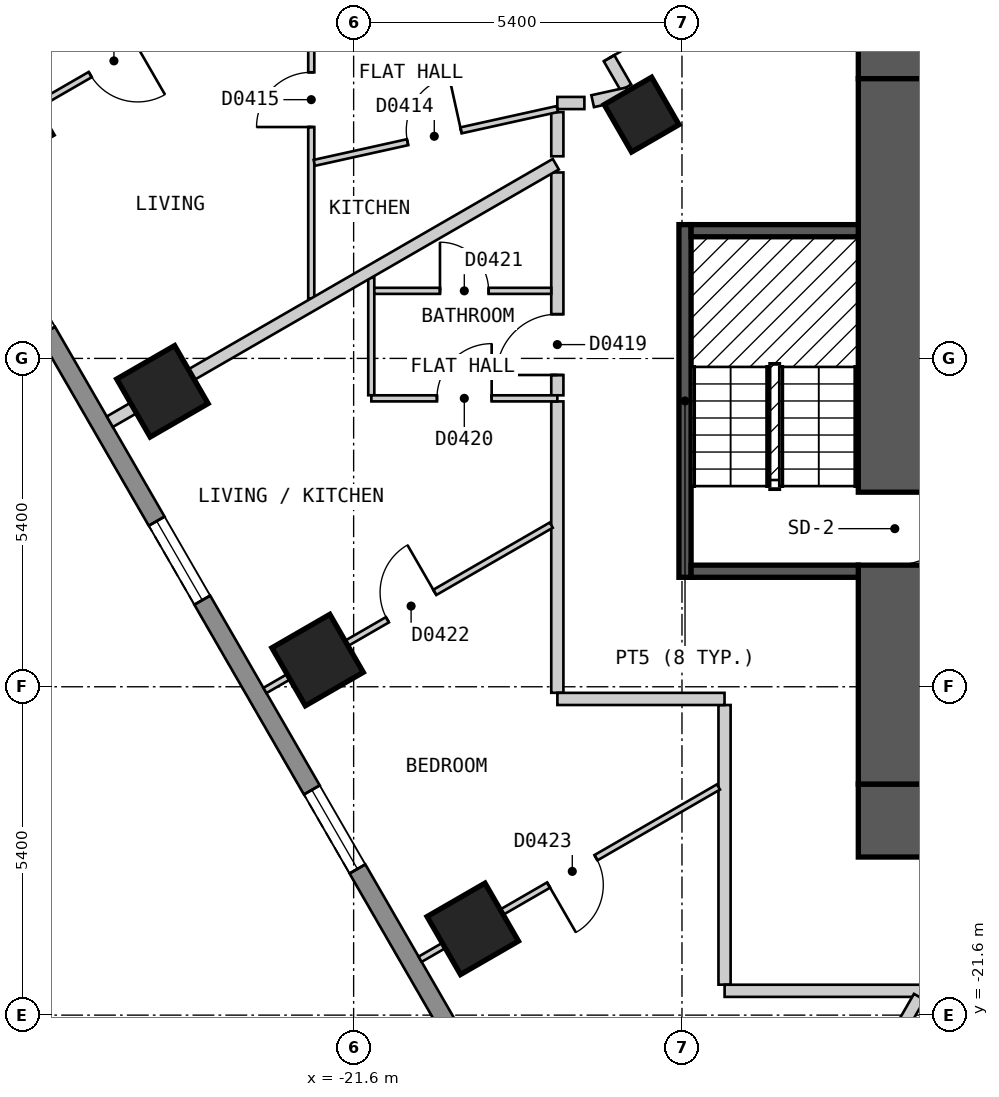
"""IFC4 building model, lengths in metres.
Left out: names, types, materials, properties, quantities, classifications, styles, units other than length and angle.
Written with IfcOpenShell. Run it as: python <this file> out.ifc"""

import sys

from ifc_helpers import new_model, si_unit, direction, frame, frame_2d, origin, origin_2d, place, context, subcontext, project, spatial, polyline, rectangle, outline, extrude, element, fill, save


model = new_model("IFC4")
c1 = context("Model", 3, precision=1e-05, world=origin(), true_north=direction((0.0, 1.0)))
c2 = subcontext(c1, "Body", "Model", "MODEL_VIEW")
j1 = project(units=[si_unit("LENGTHUNIT", "METRE"), si_unit("PLANEANGLEUNIT", "RADIAN")], contexts=[c1])
p1 = place(None, origin())
s1 = spatial("IfcSite", under=j1, at=p1, CompositionType="ELEMENT")
p2 = place(p1, origin())
s2 = spatial("IfcBuilding", under=s1, at=p2, CompositionType="ELEMENT")
p3 = place(p2, frame((0.0, 0.0, 32.4)))
s3 = spatial("IfcBuildingStorey", under=s2, at=p3, CompositionType="ELEMENT", Elevation=32.4)
for number, where, z_axis, x_axis in (
    (1, (-27.297, -6.921, 0.0), (0.0, 0.0, 1.0), (0.5, -0.866, 0.0)),
    (2, (-24.745, -11.341, 0.0), (0.0, 0.0, 1.0), (0.5, -0.866, 0.0)),
    (3, (-22.193, -15.761, 0.0), (0.0, 0.0, 1.0), (0.5, -0.866, 0.0)),
    (4, (-19.641, -20.181, 0.0), (0.0, 0.0, 1.0), (0.5, -0.866, 0.0)),
):
    element("IfcColumn", number, at=place(p3, frame(where, z_axis=z_axis, x_axis=x_axis)), inside=s3, PredefinedType="COLUMN", context=c2, shape_type="SweptSolid", body=[
        extrude(rectangle(XDim=1.1, YDim=1.1, at=origin_2d()), origin(), (0.0, 0.0, 1.0), 3.0),
    ])
p4 = place(p3, frame((-16.864, -6.791, 0.0), z_axis=(0.0, 0.0, 1.0), x_axis=(0.499984884929, -0.866034130299, 0.0)))
e5 = element("IfcColumn", 5, at=p4, inside=s3, PredefinedType="COLUMN", context=c2, shape_type="SweptSolid", body=[
    extrude(rectangle(XDim=0.9, YDim=0.9, at=origin_2d()), origin(), (0.0, 0.0, 1.0), 3.0),
])
p5 = place(p3, frame((-13.3, -18.4, 0.0), z_axis=(0.0, 0.0, 1.0), x_axis=(1.0, 0.0, 0.0)))
e6 = element("IfcWall", 6, at=p5, inside=s3, PredefinedType="SHEAR", context=c2, shape_type="SweptSolid", body=[
    extrude(rectangle(XDim=26.6, YDim=1.2, at=frame_2d((13.3, 0.0))), origin(), (0.0, 0.0, 1.0), 2.7),
])
p6 = place(p3, frame((-13.3, -5.6, 0.0), z_axis=(0.0, 0.0, 1.0), x_axis=(1.0, 0.0, 0.0)))
e7 = element("IfcWall", 7, at=p6, inside=s3, PredefinedType="SHEAR", context=c2, shape_type="SweptSolid", body=[
    extrude(rectangle(XDim=26.6, YDim=1.2, at=frame_2d((13.3, 0.0))), origin(), (0.0, 0.0, 1.0), 2.7),
])
p7 = place(p6, frame((23.65, 0.0, 0.0)))
e8 = element("IfcOpeningElement", 8, at=p7, cuts=e7, PredefinedType="OPENING", context=c2, shape_type="SweptSolid", body=[
    extrude(rectangle(XDim=1.2, YDim=2.1, at=frame_2d((0.6, 1.05))), frame((0.0, 0.61, 0.0), z_axis=(0.0, -1.0, 0.0), x_axis=(1.0, 0.0, 0.0)), (0.0, 0.0, 1.0), 1.22),
])
p8 = place(p3, frame((-12.7, -17.8, 0.0), z_axis=(0.0, 0.0, 1.0), x_axis=(0.0, 1.0, 0.0)))
e9 = element("IfcWall", 9, at=p8, inside=s3, PredefinedType="SHEAR", context=c2, shape_type="SweptSolid", body=[
    extrude(rectangle(XDim=11.6, YDim=1.2, at=frame_2d((5.8, 0.0))), origin(), (0.0, 0.0, 1.0), 2.7),
])
p9 = place(p8, frame((3.6, 0.0, 0.0)))
e10 = element("IfcOpeningElement", 10, at=p9, cuts=e9, PredefinedType="OPENING", context=c2, shape_type="SweptSolid", body=[
    extrude(rectangle(XDim=1.2, YDim=2.1, at=frame_2d((0.6, 1.05))), frame((0.0, 0.61, 0.0), z_axis=(0.0, -1.0, 0.0), x_axis=(1.0, 0.0, 0.0)), (0.0, 0.0, 1.0), 1.22),
])
p10 = place(p3, frame((-31.22, -2.425, 0.0), z_axis=(0.0, 0.0, 1.0), x_axis=(0.500001938803, -0.866024284413, 0.0)))
e11 = element("IfcWall", 11, at=p10, inside=s3, PredefinedType="SOLIDWALL", context=c2, shape_type="SweptSolid", body=[
    extrude(outline(polyline([(0.0, -0.15), (27.02, -0.15), (26.94, 0.15), (0.08, 0.15), (0.0, -0.15)])), origin(), (0.0, 0.0, 1.0), 2.7),
])
p11 = place(p10, frame((2.553, 0.0, 0.15)))
e12 = element("IfcOpeningElement", 12, at=p11, cuts=e11, PredefinedType="OPENING", context=c2, shape_type="SweptSolid", body=[
    extrude(rectangle(XDim=1.5, YDim=2.1, at=frame_2d((0.75, 1.05))), frame((0.0, 0.16, 0.0), z_axis=(0.0, -1.0, 0.0), x_axis=(1.0, 0.0, 0.0)), (0.0, 0.0, 1.0), 0.32),
])
p12 = place(p10, frame((7.657, 0.0, 0.15)))
e13 = element("IfcOpeningElement", 13, at=p12, cuts=e11, PredefinedType="OPENING", context=c2, shape_type="SweptSolid", body=[
    extrude(rectangle(XDim=1.5, YDim=2.1, at=frame_2d((0.75, 1.05))), frame((0.0, 0.16, 0.0), z_axis=(0.0, -1.0, 0.0), x_axis=(1.0, 0.0, 0.0)), (0.0, 0.0, 1.0), 0.32),
])
p13 = place(p10, frame((12.761, 0.0, 0.15)))
e14 = element("IfcOpeningElement", 14, at=p13, cuts=e11, PredefinedType="OPENING", context=c2, shape_type="SweptSolid", body=[
    extrude(rectangle(XDim=1.5, YDim=2.1, at=frame_2d((0.75, 1.05))), frame((0.0, 0.16, 0.0), z_axis=(0.0, -1.0, 0.0), x_axis=(1.0, 0.0, 0.0)), (0.0, 0.0, 1.0), 0.32),
])
p14 = place(p10, frame((17.865, 0.0, 0.15)))
e15 = element("IfcOpeningElement", 15, at=p14, cuts=e11, PredefinedType="OPENING", context=c2, shape_type="SweptSolid", body=[
    extrude(rectangle(XDim=1.5, YDim=2.1, at=frame_2d((0.75, 1.05))), frame((0.0, 0.16, 0.0), z_axis=(0.0, -1.0, 0.0), x_axis=(1.0, 0.0, 0.0)), (0.0, 0.0, 1.0), 0.32),
])
p15 = place(p10, frame((22.969, 0.0, 0.15)))
e16 = element("IfcOpeningElement", 16, at=p15, cuts=e11, PredefinedType="OPENING", context=c2, shape_type="SweptSolid", body=[
    extrude(rectangle(XDim=1.5, YDim=2.1, at=frame_2d((0.75, 1.05))), frame((0.0, 0.16, 0.0), z_axis=(0.0, -1.0, 0.0), x_axis=(1.0, 0.0, 0.0)), (0.0, 0.0, 1.0), 0.32),
])
p16 = place(p3, frame((-20.727, -0.101, 0.0), z_axis=(0.0, 0.0, 1.0), x_axis=(0.500049702773, -0.865996705973, 0.0)))
e17 = element("IfcWall", 17, at=p16, inside=s3, PredefinedType="PARTITIONING", context=c2, shape_type="SweptSolid", body=[
    extrude(rectangle(XDim=7.211, YDim=0.2, at=frame_2d((3.605, 0.0))), origin(), (0.0, 0.0, 1.0), 2.7),
])
p17 = place(p16, frame((5.654, 0.0, 0.0)))
e18 = element("IfcOpeningElement", 18, at=p17, cuts=e17, PredefinedType="OPENING", context=c2, shape_type="SweptSolid", body=[
    extrude(rectangle(XDim=1.0, YDim=2.1, at=frame_2d((0.5, 1.05))), frame((0.0, 0.11, 0.0), z_axis=(0.0, -1.0, 0.0), x_axis=(1.0, 0.0, 0.0)), (0.0, 0.0, 1.0), 0.22),
])
p18 = place(p3, frame((-15.5, -16.5, 0.0), z_axis=(0.0, 0.0, 1.0), x_axis=(0.0, -1.0, 0.0)))
e19 = element("IfcWall", 19, at=p18, inside=s3, PredefinedType="PARTITIONING", context=c2, shape_type="SweptSolid", body=[
    extrude(rectangle(XDim=4.599, YDim=0.2, at=frame_2d((2.3, 0.0))), origin(), (0.0, 0.0, 1.0), 2.7),
])
p19 = place(p3, frame((-18.25, -11.507, 0.0), z_axis=(0.0, 0.0, 1.0), x_axis=(0.0, -1.0, 0.0)))
e20 = element("IfcWall", 20, at=p19, inside=s3, PredefinedType="PARTITIONING", context=c2, shape_type="SweptSolid", body=[
    extrude(rectangle(XDim=4.792, YDim=0.2, at=frame_2d((2.396, 0.0))), origin(), (0.0, 0.0, 1.0), 2.7),
])
p20 = place(p3, frame((-18.25, -6.6, 0.0), z_axis=(0.0, 0.0, 1.0), x_axis=(1.0, 0.0, 0.0)))
e21 = element("IfcWall", 21, at=p20, inside=s3, PredefinedType="PARTITIONING", context=c2, shape_type="SweptSolid", body=[
    extrude(rectangle(XDim=0.445, YDim=0.2, at=frame_2d((0.223, 0.0))), origin(), (0.0, 0.0, 1.0), 2.7),
])
p21 = place(p3, frame((-18.249, -16.4, 0.0), z_axis=(0.0, 0.0, 1.0), x_axis=(1.0, 0.0, 0.0)))
e22 = element("IfcWall", 22, at=p21, inside=s3, PredefinedType="PARTITIONING", context=c2, shape_type="SweptSolid", body=[
    extrude(rectangle(XDim=2.749, YDim=0.2, at=frame_2d((1.375, 0.0))), origin(), (0.0, 0.0, 1.0), 2.7),
])
p22 = place(p3, frame((-15.499, -21.2, 0.0), z_axis=(0.0, 0.0, 1.0), x_axis=(1.0, 0.0, 0.0)))
e23 = element("IfcWall", 23, at=p22, inside=s3, PredefinedType="PARTITIONING", context=c2, shape_type="SweptSolid", body=[
    extrude(rectangle(XDim=30.898, YDim=0.2, at=frame_2d((15.449, 0.0))), origin(), (0.0, 0.0, 1.0), 2.7),
])
p23 = place(p22, frame((15.0, 0.0, 0.0)))
e24 = element("IfcOpeningElement", 24, at=p23, cuts=e23, PredefinedType="OPENING", context=c2, shape_type="SweptSolid", body=[
    extrude(rectangle(XDim=1.0, YDim=2.1, at=frame_2d((0.5, 1.05))), frame((0.0, 0.11, 0.0), z_axis=(0.0, -1.0, 0.0), x_axis=(1.0, 0.0, 0.0)), (0.0, 0.0, 1.0), 0.22),
])
p24 = place(p22, frame((20.104, 0.0, 0.0)))
e25 = element("IfcOpeningElement", 25, at=p24, cuts=e23, PredefinedType="OPENING", context=c2, shape_type="SweptSolid", body=[
    extrude(rectangle(XDim=1.0, YDim=2.1, at=frame_2d((0.5, 1.05))), frame((0.0, 0.11, 0.0), z_axis=(0.0, -1.0, 0.0), x_axis=(1.0, 0.0, 0.0)), (0.0, 0.0, 1.0), 0.22),
])
p25 = place(p3, frame((-18.25, -11.407, 0.0), z_axis=(0.0, 0.0, 1.0), x_axis=(0.0, 1.0, 0.0)))
e26 = element("IfcWall", 26, at=p25, inside=s3, PredefinedType="PARTITIONING", context=c2, shape_type="SweptSolid", body=[
    extrude(rectangle(XDim=3.665, YDim=0.2, at=frame_2d((1.833, 0.0))), origin(), (0.0, 0.0, 1.0), 2.7),
])
p26 = place(p25, frame((0.334, 0.0, 0.0)))
e27 = element("IfcOpeningElement", 27, at=p26, cuts=e26, PredefinedType="OPENING", context=c2, shape_type="SweptSolid", body=[
    extrude(rectangle(XDim=1.0, YDim=2.1, at=frame_2d((0.5, 1.05))), frame((0.0, 0.11, 0.0), z_axis=(0.0, -1.0, 0.0), x_axis=(1.0, 0.0, 0.0)), (0.0, 0.0, 1.0), 0.22),
])
p27 = place(p3, frame((-18.25, -7.476, 0.0), z_axis=(0.0, 0.0, 1.0), x_axis=(0.0, 1.0, 0.0)))
e28 = element("IfcWall", 28, at=p27, inside=s3, PredefinedType="PARTITIONING", context=c2, shape_type="SweptSolid", body=[
    extrude(rectangle(XDim=0.726, YDim=0.2, at=frame_2d((0.363, 0.0))), origin(), (0.0, 0.0, 1.0), 2.7),
])
p28 = place(p3, frame((-21.31, -9.474, 0.0), z_axis=(0.0, 0.0, 1.0), x_axis=(0.0, -1.0, 0.0)))
e29 = element("IfcWall", 29, at=p28, inside=s3, PredefinedType="PARTITIONING", context=c2, shape_type="SweptSolid", body=[
    extrude(rectangle(XDim=1.932, YDim=0.1, at=frame_2d((0.966, 0.0))), origin(), (0.0, 0.0, 1.0), 2.7),
])
p29 = place(p3, frame((-21.26, -9.689, 0.0), z_axis=(0.0, 0.0, 1.0), x_axis=(1.0, 0.0, 0.0)))
e30 = element("IfcWall", 30, at=p29, inside=s3, PredefinedType="PARTITIONING", context=c2, shape_type="SweptSolid", body=[
    extrude(rectangle(XDim=2.91, YDim=0.1, at=frame_2d((1.455, 0.0))), origin(), (0.0, 0.0, 1.0), 2.7),
])
p30 = place(p29, frame((1.08, 0.0, 0.0)))
e31 = element("IfcOpeningElement", 31, at=p30, cuts=e30, PredefinedType="OPENING", context=c2, shape_type="SweptSolid", body=[
    extrude(rectangle(XDim=0.8, YDim=2.1, at=frame_2d((0.4, 1.05))), frame((0.0, 0.06, 0.0), z_axis=(0.0, -1.0, 0.0), x_axis=(1.0, 0.0, 0.0)), (0.0, 0.0, 1.0), 0.12),
])
p31 = place(p3, frame((-21.309, -11.457, 0.0), z_axis=(0.0, 0.0, 1.0), x_axis=(1.0, 0.0, 0.0)))
e32 = element("IfcWall", 32, at=p31, inside=s3, PredefinedType="PARTITIONING", context=c2, shape_type="SweptSolid", body=[
    extrude(rectangle(XDim=3.059, YDim=0.1, at=frame_2d((1.53, 0.0))), origin(), (0.0, 0.0, 1.0), 2.7),
])
p32 = place(p31, frame((1.079, 0.0, 0.0)))
e33 = element("IfcOpeningElement", 33, at=p32, cuts=e32, PredefinedType="OPENING", context=c2, shape_type="SweptSolid", body=[
    extrude(rectangle(XDim=0.9, YDim=2.1, at=frame_2d((0.45, 1.05))), frame((0.0, 0.06, 0.0), z_axis=(0.0, -1.0, 0.0), x_axis=(1.0, 0.0, 0.0)), (0.0, 0.0, 1.0), 0.12),
])
p33 = place(p3, frame((-22.297, -9.813, 0.0), z_axis=(0.0, 0.0, 1.0), x_axis=(0.0, 1.0, 0.0)))
e34 = element("IfcWall", 34, at=p33, inside=s3, PredefinedType="PARTITIONING", context=c2, shape_type="SweptSolid", body=[
    extrude(rectangle(XDim=4.338, YDim=0.1, at=frame_2d((2.169, 0.0))), origin(), (0.0, 0.0, 1.0), 2.7),
])
p34 = place(p33, frame((2.818, 0.0, 0.0)))
e35 = element("IfcOpeningElement", 35, at=p34, cuts=e34, PredefinedType="OPENING", context=c2, shape_type="SweptSolid", body=[
    extrude(rectangle(XDim=0.9, YDim=2.1, at=frame_2d((0.45, 1.05))), frame((0.0, 0.06, 0.0), z_axis=(0.0, -1.0, 0.0), x_axis=(1.0, 0.0, 0.0)), (0.0, 0.0, 1.0), 0.12),
])
p35 = place(p3, frame((-22.247, -7.584, 0.0), z_axis=(0.0, 0.0, 1.0), x_axis=(0.97635375062, 0.216178985219, 0.0)))
e36 = element("IfcWall", 36, at=p35, inside=s3, PredefinedType="PARTITIONING", context=c2, shape_type="SweptSolid", body=[
    extrude(rectangle(XDim=4.094, YDim=0.1, at=frame_2d((2.047, 0.0))), origin(), (0.0, 0.0, 1.0), 2.7),
])
p36 = place(p35, frame((1.571, 0.0, 0.0)))
e37 = element("IfcOpeningElement", 37, at=p36, cuts=e36, PredefinedType="OPENING", context=c2, shape_type="SweptSolid", body=[
    extrude(rectangle(XDim=0.9, YDim=2.1, at=frame_2d((0.45, 1.05))), frame((0.0, 0.06, 0.0), z_axis=(0.0, -1.0, 0.0), x_axis=(1.0, 0.0, 0.0)), (0.0, 0.0, 1.0), 0.12),
])
p37 = place(p3, frame((-20.507, -20.681, 0.0), z_axis=(0.0, 0.0, 1.0), x_axis=(0.866028446103, 0.499994730513, 0.0)))
e38 = element("IfcWall", 38, at=p37, inside=s3, PredefinedType="PARTITIONING", context=c2, shape_type="SweptSolid", body=[
    extrude(rectangle(XDim=5.666, YDim=0.1, at=frame_2d((2.833, 0.0))), origin(), (0.0, 0.0, 1.0), 2.7),
])
p38 = place(p37, frame((2.44, 0.0, 0.0)))
e39 = element("IfcOpeningElement", 39, at=p38, cuts=e38, PredefinedType="OPENING", context=c2, shape_type="SweptSolid", body=[
    extrude(rectangle(XDim=0.9, YDim=2.1, at=frame_2d((0.45, 1.05))), frame((0.0, 0.06, 0.0), z_axis=(0.0, -1.0, 0.0), x_axis=(1.0, 0.0, 0.0)), (0.0, 0.0, 1.0), 0.12),
])
p39 = place(p3, frame((-23.059, -16.261, 0.0), z_axis=(0.0, 0.0, 1.0), x_axis=(0.866004639177, 0.500035963631, 0.0)))
e40 = element("IfcWall", 40, at=p39, inside=s3, PredefinedType="PARTITIONING", context=c2, shape_type="SweptSolid", body=[
    extrude(rectangle(XDim=5.438, YDim=0.1, at=frame_2d((2.719, 0.0))), origin(), (0.0, 0.0, 1.0), 2.7),
])
p40 = place(p39, frame((2.326, 0.0, 0.0)))
e41 = element("IfcOpeningElement", 41, at=p40, cuts=e40, PredefinedType="OPENING", context=c2, shape_type="SweptSolid", body=[
    extrude(rectangle(XDim=0.9, YDim=2.1, at=frame_2d((0.45, 1.05))), frame((0.0, 0.06, 0.0), z_axis=(0.0, -1.0, 0.0), x_axis=(1.0, 0.0, 0.0)), (0.0, 0.0, 1.0), 0.12),
])
p41 = place(p3, frame((-28.163, -7.42, 0.0), z_axis=(0.0, 0.0, 1.0), x_axis=(0.866065245018, 0.499930986609, 0.0)))
e42 = element("IfcWall", 42, at=p41, inside=s3, PredefinedType="PARTITIONING", context=c2, shape_type="SweptSolid", body=[
    extrude(rectangle(XDim=10.0, YDim=0.1, at=frame_2d((5.0, 0.0))), origin(), (0.0, 0.0, 1.0), 2.7),
])
p42 = place(p41, frame((2.576, 0.0, 0.0)))
e43 = element("IfcOpeningElement", 43, at=p42, cuts=e42, PredefinedType="OPENING", context=c2, shape_type="SweptSolid", body=[
    extrude(rectangle(XDim=0.9, YDim=2.1, at=frame_2d((0.45, 1.05))), frame((0.0, 0.06, 0.0), z_axis=(0.0, -1.0, 0.0), x_axis=(1.0, 0.0, 0.0)), (0.0, 0.0, 1.0), 0.12),
])
p43 = place(p3, frame((-12.661, -21.929, 0.0), z_axis=(0.0, 0.0, 1.0), x_axis=(0.499683639304, 0.866207977689, 0.0)))
e44 = element("IfcWall", 44, at=p43, inside=s3, PredefinedType="PARTITIONING", context=c2, shape_type="SweptSolid", body=[
    extrude(rectangle(XDim=0.726, YDim=0.2, at=frame_2d((0.363, 0.0))), origin(), (0.0, 0.0, 1.0), 2.7),
])
p44 = place(p3, frame((-17.669, -6.57, 0.0), z_axis=(0.0, 0.0, 1.0), x_axis=(0.976422724526, 0.215867234728, 0.0)))
e45 = element("IfcWall", 45, at=p44, inside=s3, PredefinedType="PARTITIONING", context=c2, shape_type="SweptSolid", body=[
    extrude(rectangle(XDim=0.583, YDim=0.2, at=frame_2d((0.292, 0.0))), origin(), (0.0, 0.0, 1.0), 2.7),
])
p45 = place(p3, frame((-25.61, -11.841, 0.0), z_axis=(0.0, 0.0, 1.0), x_axis=(0.866019023803, 0.500011050288, 0.0)))
e46 = element("IfcWall", 46, at=p45, inside=s3, PredefinedType="PARTITIONING", context=c2, shape_type="SweptSolid", body=[
    extrude(rectangle(XDim=8.47, YDim=0.2, at=frame_2d((4.235, 0.0))), origin(), (0.0, 0.0, 1.0), 2.7),
])
p46 = place(p3, frame((-16.15, -14.4, 0.0), z_axis=(0.0, 0.0, 1.0), x_axis=(0.0, 1.0, 0.0)))
e47 = element("IfcWall", 47, at=p46, inside=s3, PredefinedType="SOLIDWALL", context=c2, shape_type="SweptSolid", body=[
    extrude(rectangle(XDim=5.8, YDim=0.2, at=frame_2d((2.9, 0.0))), origin(), (0.0, 0.0, 1.0), 2.7),
])
for number, where, z_axis, x_axis in (
    (48, (-16.05, -14.3, 0.0), (0.0, 0.0, 1.0), (1.0, 0.0, 0.0)),
    (49, (-16.05, -8.7, 0.0), (0.0, 0.0, 1.0), (1.0, 0.0, 0.0)),
):
    element("IfcWall", number, at=place(p3, frame(where, z_axis=z_axis, x_axis=x_axis)), inside=s3, PredefinedType="SOLIDWALL", context=c2, shape_type="SweptSolid", body=[
        extrude(rectangle(XDim=2.75, YDim=0.2, at=frame_2d((1.375, 0.0))), origin(), (0.0, 0.0, 1.0), 2.7),
    ])
p47 = place(p13, origin())
e50 = element("IfcWindow", 50, at=p47, inside=s3, PartitioningType="SINGLE_PANEL", PredefinedType="WINDOW", context=c2, shape_type="SweptSolid", body=[
    extrude(rectangle(XDim=1.5, YDim=2.1, at=frame_2d((0.75, 1.05))), frame((0.0, 0.03, 0.0), z_axis=(0.0, -1.0, 0.0), x_axis=(1.0, 0.0, 0.0)), (0.0, 0.0, 1.0), 0.06),
])
fill(e14, e50)
p48 = place(p14, origin())
e51 = element("IfcWindow", 51, at=p48, inside=s3, PartitioningType="SINGLE_PANEL", PredefinedType="WINDOW", context=c2, shape_type="SweptSolid", body=[
    extrude(rectangle(XDim=1.5, YDim=2.1, at=frame_2d((0.75, 1.05))), frame((0.0, 0.03, 0.0), z_axis=(0.0, -1.0, 0.0), x_axis=(1.0, 0.0, 0.0)), (0.0, 0.0, 1.0), 0.06),
])
fill(e15, e51)
p49 = place(p17, origin())
e52 = element("IfcDoor", 52, at=p49, inside=s3, OperationType="SINGLE_SWING_RIGHT", PredefinedType="DOOR", context=c2, shape_type="SweptSolid", body=[
    extrude(rectangle(XDim=1.0, YDim=2.1, at=frame_2d((0.5, 1.05))), frame((0.0, 0.025, 0.0), z_axis=(0.0, -1.0, 0.0), x_axis=(1.0, 0.0, 0.0)), (0.0, 0.0, 1.0), 0.05),
])
fill(e18, e52)
p50 = place(p36, origin())
e53 = element("IfcDoor", 53, at=p50, inside=s3, OperationType="SINGLE_SWING_RIGHT", PredefinedType="DOOR", context=c2, shape_type="SweptSolid", body=[
    extrude(rectangle(XDim=0.9, YDim=2.1, at=frame_2d((0.45, 1.05))), frame((0.0, 0.025, 0.0), z_axis=(0.0, -1.0, 0.0), x_axis=(1.0, 0.0, 0.0)), (0.0, 0.0, 1.0), 0.05),
])
fill(e37, e53)
p51 = place(p34, origin())
e54 = element("IfcDoor", 54, at=p51, inside=s3, OperationType="SINGLE_SWING_LEFT", PredefinedType="DOOR", context=c2, shape_type="SweptSolid", body=[
    extrude(rectangle(XDim=0.9, YDim=2.1, at=frame_2d((0.45, 1.05))), frame((0.0, 0.025, 0.0), z_axis=(0.0, -1.0, 0.0), x_axis=(1.0, 0.0, 0.0)), (0.0, 0.0, 1.0), 0.05),
])
fill(e35, e54)
p52 = place(p42, origin())
e55 = element("IfcDoor", 55, at=p52, inside=s3, OperationType="SINGLE_SWING_RIGHT", PredefinedType="DOOR", context=c2, shape_type="SweptSolid", body=[
    extrude(rectangle(XDim=0.9, YDim=2.1, at=frame_2d((0.45, 1.05))), frame((0.0, 0.025, 0.0), z_axis=(0.0, -1.0, 0.0), x_axis=(1.0, 0.0, 0.0)), (0.0, 0.0, 1.0), 0.05),
])
fill(e43, e55)
p53 = place(p26, origin())
e56 = element("IfcDoor", 56, at=p53, inside=s3, OperationType="SINGLE_SWING_LEFT", PredefinedType="DOOR", context=c2, shape_type="SweptSolid", body=[
    extrude(rectangle(XDim=1.0, YDim=2.1, at=frame_2d((0.5, 1.05))), frame((0.0, 0.025, 0.0), z_axis=(0.0, -1.0, 0.0), x_axis=(1.0, 0.0, 0.0)), (0.0, 0.0, 1.0), 0.05),
])
fill(e27, e56)
p54 = place(p32, origin())
e57 = element("IfcDoor", 57, at=p54, inside=s3, OperationType="SINGLE_SWING_RIGHT", PredefinedType="DOOR", context=c2, shape_type="SweptSolid", body=[
    extrude(rectangle(XDim=0.9, YDim=2.1, at=frame_2d((0.45, 1.05))), frame((0.0, 0.025, 0.0), z_axis=(0.0, -1.0, 0.0), x_axis=(1.0, 0.0, 0.0)), (0.0, 0.0, 1.0), 0.05),
])
fill(e33, e57)
p55 = place(p30, origin())
e58 = element("IfcDoor", 58, at=p55, inside=s3, OperationType="SINGLE_SWING_LEFT", PredefinedType="DOOR", context=c2, shape_type="SweptSolid", body=[
    extrude(rectangle(XDim=0.8, YDim=2.1, at=frame_2d((0.4, 1.05))), frame((0.0, 0.025, 0.0), z_axis=(0.0, -1.0, 0.0), x_axis=(1.0, 0.0, 0.0)), (0.0, 0.0, 1.0), 0.05),
])
fill(e31, e58)
p56 = place(p40, origin())
e59 = element("IfcDoor", 59, at=p56, inside=s3, OperationType="SINGLE_SWING_RIGHT", PredefinedType="DOOR", context=c2, shape_type="SweptSolid", body=[
    extrude(rectangle(XDim=0.9, YDim=2.1, at=frame_2d((0.45, 1.05))), frame((0.0, 0.025, 0.0), z_axis=(0.0, -1.0, 0.0), x_axis=(1.0, 0.0, 0.0)), (0.0, 0.0, 1.0), 0.05),
])
fill(e41, e59)
p57 = place(p38, origin())
e60 = element("IfcDoor", 60, at=p57, inside=s3, OperationType="SINGLE_SWING_LEFT", PredefinedType="DOOR", context=c2, shape_type="SweptSolid", body=[
    extrude(rectangle(XDim=0.9, YDim=2.1, at=frame_2d((0.45, 1.05))), frame((0.0, 0.025, 0.0), z_axis=(0.0, -1.0, 0.0), x_axis=(1.0, 0.0, 0.0)), (0.0, 0.0, 1.0), 0.05),
])
fill(e39, e60)
p58 = place(p9, origin())
e61 = element("IfcDoor", 61, at=p58, inside=s3, OperationType="SINGLE_SWING_RIGHT", PredefinedType="DOOR", context=c2, shape_type="SweptSolid", body=[
    extrude(rectangle(XDim=1.2, YDim=2.1, at=frame_2d((0.6, 1.05))), frame((0.0, 0.025, 0.0), z_axis=(0.0, -1.0, 0.0), x_axis=(1.0, 0.0, 0.0)), (0.0, 0.0, 1.0), 0.05),
])
fill(e10, e61)
save(model, sys.argv[1])
